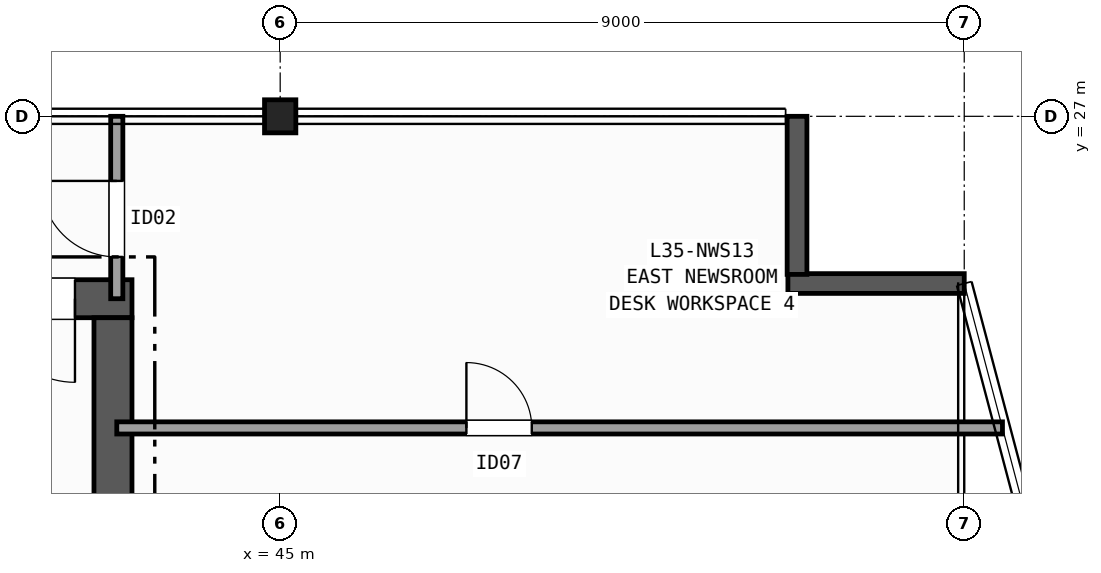
"""IFC4 building model, lengths in metres.
Left out: names, types, materials, properties, quantities, classifications, styles, units other than length and angle.
Written with IfcOpenShell. Run it as: python <this file> out.ifc"""

import sys

from ifc_helpers import new_model, si_unit, direction, frame, frame_2d, origin, origin_2d, place, context, subcontext, project, spatial, rectangle, i_section, extrude, element, fill, save


model = new_model("IFC4")
c1 = context("Model", 3, precision=1e-05, world=origin(), true_north=direction((0.0, 1.0)))
c2 = subcontext(c1, "Body", "Model", "MODEL_VIEW")
j1 = project(units=[si_unit("LENGTHUNIT", "METRE"), si_unit("PLANEANGLEUNIT", "RADIAN")], contexts=[c1])
p1 = place(None, origin())
s1 = spatial("IfcSite", under=j1, at=p1, CompositionType="ELEMENT")
p2 = place(p1, origin())
s2 = spatial("IfcBuilding", under=s1, at=p2, CompositionType="ELEMENT")
p3 = place(p2, frame((0.0, 0.0, 143.3)))
s3 = spatial("IfcBuildingStorey", under=s2, at=p3, CompositionType="ELEMENT", Elevation=143.3)
p4 = place(p3, frame((45.0, 27.0, 0.0), z_axis=(0.0, 0.0, 1.0), x_axis=(1.0, 0.0, 0.0)))
e1 = element("IfcColumn", 1, at=p4, inside=s3, PredefinedType="COLUMN", context=c2, shape_type="SweptSolid", body=[
    extrude(i_section(OverallWidth=0.412, OverallDepth=0.435, WebThickness=0.036, FlangeThickness=0.057, FilletRadius=0.015, at=origin_2d()), origin(), (0.0, 0.0, 1.0), 3.7),
])
p5 = place(p3, frame((54.0, 24.8, 0.0), z_axis=(0.0, 0.0, 1.0), x_axis=(-1.0, 0.0, 0.0)))
e2 = element("IfcWall", 2, at=p5, inside=s3, PredefinedType="SOLIDWALL", context=c2, shape_type="SweptSolid", body=[
    extrude(rectangle(XDim=2.32, YDim=0.26, at=frame_2d((1.16, 0.0))), origin(), (0.0, 0.0, 1.0), 3.42),
])
p6 = place(p3, frame((51.8, 24.92, 0.0), z_axis=(0.0, 0.0, 1.0), x_axis=(0.0, 1.0, 0.0)))
e3 = element("IfcWall", 3, at=p6, inside=s3, PredefinedType="SOLIDWALL", context=c2, shape_type="SweptSolid", body=[
    extrude(rectangle(XDim=2.08, YDim=0.26, at=frame_2d((1.04, 0.0))), origin(), (0.0, 0.0, 1.0), 3.42),
])
p7 = place(p3, frame((43.05, 24.6, 0.0), z_axis=(0.0, 0.0, 1.0), x_axis=(-1.0, 0.0, 0.0)))
e4 = element("IfcWall", 4, at=p7, inside=s3, PredefinedType="SHEAR", context=c2, shape_type="SweptSolid", body=[
    extrude(rectangle(XDim=13.9, YDim=0.5, at=frame_2d((6.95, 0.0))), origin(), (0.0, 0.0, 1.0), 3.42),
])
p8 = place(p7, frame((0.75, 0.0, 0.0)))
e5 = element("IfcOpeningElement", 5, at=p8, cuts=e4, PredefinedType="OPENING", context=c2, shape_type="SweptSolid", body=[
    extrude(rectangle(XDim=1.1, YDim=2.15, at=frame_2d((0.55, 1.075))), frame((0.0, 0.26, 0.0), z_axis=(0.0, -1.0, 0.0), x_axis=(1.0, 0.0, 0.0)), (0.0, 0.0, 1.0), 0.52),
])
p9 = place(p7, frame((2.7, 0.0, 0.0)))
e6 = element("IfcOpeningElement", 6, at=p9, cuts=e4, PredefinedType="OPENING", context=c2, shape_type="SweptSolid", body=[
    extrude(rectangle(XDim=0.9, YDim=2.1, at=frame_2d((0.45, 1.05))), frame((0.0, 0.26, 0.0), z_axis=(0.0, -1.0, 0.0), x_axis=(1.0, 0.0, 0.0)), (0.0, 0.0, 1.0), 0.52),
])
p10 = place(p7, frame((4.6, 0.0, 0.0)))
e7 = element("IfcOpeningElement", 7, at=p10, cuts=e4, PredefinedType="OPENING", context=c2, shape_type="SweptSolid", body=[
    extrude(rectangle(XDim=0.9, YDim=2.1, at=frame_2d((0.45, 1.05))), frame((0.0, 0.26, 0.0), z_axis=(0.0, -1.0, 0.0), x_axis=(1.0, 0.0, 0.0)), (0.0, 0.0, 1.0), 0.52),
])
p11 = place(p3, frame((42.8, 11.45, 0.0), z_axis=(0.0, 0.0, 1.0), x_axis=(0.0, 1.0, 0.0)))
e8 = element("IfcWall", 8, at=p11, inside=s3, PredefinedType="SHEAR", context=c2, shape_type="SweptSolid", body=[
    extrude(rectangle(XDim=12.9, YDim=0.5, at=frame_2d((6.45, 0.0))), origin(), (0.0, 0.0, 1.0), 3.42),
])
p12 = place(p3, frame((42.85, 24.6, 0.0), z_axis=(0.0, 0.0, 1.0), x_axis=(0.0, 1.0, 0.0)))
e9 = element("IfcWall", 9, at=p12, inside=s3, PredefinedType="PARTITIONING", context=c2, shape_type="SweptSolid", body=[
    extrude(rectangle(XDim=2.4, YDim=0.16, at=frame_2d((1.2, 0.0))), origin(), (0.0, 0.0, 1.0), 2.634),
])
p13 = place(p12, frame((0.55, 0.0, 0.0)))
e10 = element("IfcOpeningElement", 10, at=p13, cuts=e9, PredefinedType="OPENING", context=c2, shape_type="SweptSolid", body=[
    extrude(rectangle(XDim=1.0, YDim=2.1, at=frame_2d((0.5, 1.05))), frame((0.0, 0.09, 0.0), z_axis=(0.0, -1.0, 0.0), x_axis=(1.0, 0.0, 0.0)), (0.0, 0.0, 1.0), 0.18),
])
p14 = place(p3, frame((42.85, 22.9, 0.0), z_axis=(0.0, 0.0, 1.0), x_axis=(1.0, 0.0, 0.0)))
e11 = element("IfcWall", 11, at=p14, inside=s3, PredefinedType="PARTITIONING", context=c2, shape_type="SweptSolid", body=[
    extrude(rectangle(XDim=11.653, YDim=0.16, at=frame_2d((5.826, 0.0))), origin(), (0.0, 0.0, 1.0), 3.42),
])
p15 = place(p14, frame((4.6, 0.0, 0.0)))
e12 = element("IfcOpeningElement", 12, at=p15, cuts=e11, PredefinedType="OPENING", context=c2, shape_type="SweptSolid", body=[
    extrude(rectangle(XDim=0.86, YDim=2.05, at=frame_2d((0.43, 1.025))), frame((0.0, 0.09, 0.0), z_axis=(0.0, -1.0, 0.0), x_axis=(1.0, 0.0, 0.0)), (0.0, 0.0, 1.0), 0.18),
])
p16 = place(p8, origin())
e13 = element("IfcDoor", 13, at=p16, inside=s3, OperationType="SINGLE_SWING_LEFT", PredefinedType="DOOR", context=c2, shape_type="SweptSolid", body=[
    extrude(rectangle(XDim=1.1, YDim=2.15, at=frame_2d((0.55, 1.075))), frame((0.0, 0.025, 0.0), z_axis=(0.0, -1.0, 0.0), x_axis=(1.0, 0.0, 0.0)), (0.0, 0.0, 1.0), 0.05),
])
fill(e5, e13)
p17 = place(p13, origin())
e14 = element("IfcDoor", 14, at=p17, inside=s3, OperationType="SINGLE_SWING_RIGHT", PredefinedType="DOOR", context=c2, shape_type="SweptSolid", body=[
    extrude(rectangle(XDim=1.0, YDim=2.1, at=frame_2d((0.5, 1.05))), frame((0.0, 0.025, 0.0), z_axis=(0.0, -1.0, 0.0), x_axis=(1.0, 0.0, 0.0)), (0.0, 0.0, 1.0), 0.05),
])
fill(e10, e14)
p18 = place(p15, origin())
e15 = element("IfcDoor", 15, at=p18, inside=s3, OperationType="SINGLE_SWING_LEFT", PredefinedType="DOOR", context=c2, shape_type="SweptSolid", body=[
    extrude(rectangle(XDim=0.86, YDim=2.05, at=frame_2d((0.43, 1.025))), frame((0.0, 0.025, 0.0), z_axis=(0.0, -1.0, 0.0), x_axis=(1.0, 0.0, 0.0)), (0.0, 0.0, 1.0), 0.05),
])
fill(e12, e15)
save(model, sys.argv[1])
